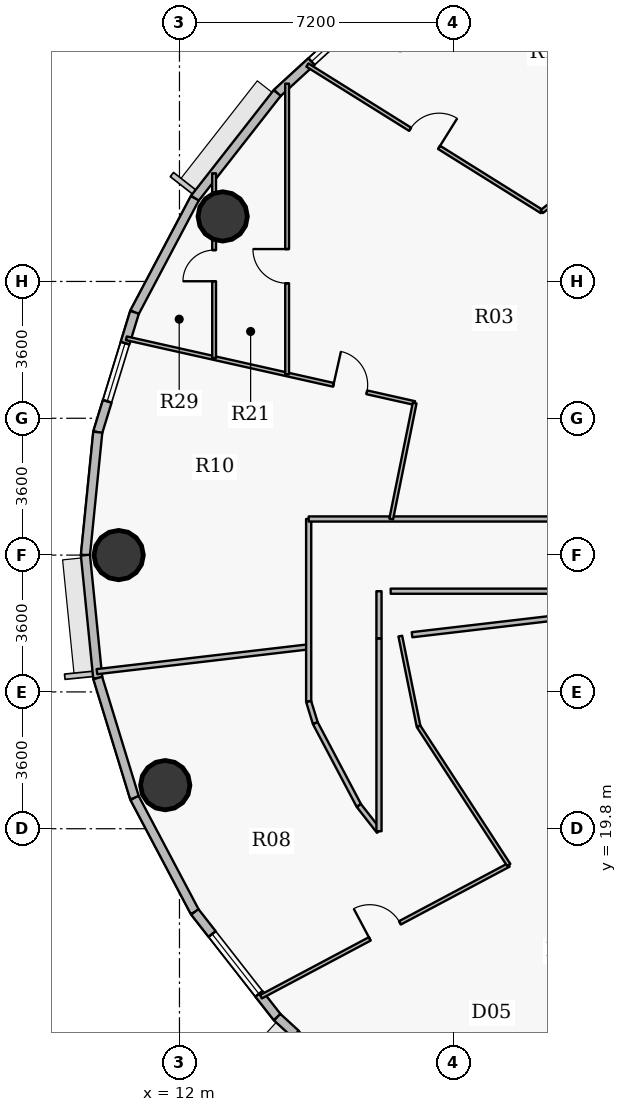
"""IFC4 building model, lengths in metres.
Left out: names, types, materials, properties, quantities, classifications, styles, units other than length and angle.
Written with IfcOpenShell. Run it as: python <this file> out.ifc"""

import sys

from ifc_helpers import new_model, si_unit, direction, frame, frame_2d, origin, origin_2d, place, context, subcontext, project, spatial, rectangle, hollow_circle, extrude, source, transform, mapped, element, fill, save


model = new_model("IFC4")
c1 = context("Model", 3, precision=1e-05, world=origin(), true_north=direction((0.0, 1.0)))
c2 = subcontext(c1, "Body", "Model", "MODEL_VIEW")
j1 = project(units=[si_unit("LENGTHUNIT", "METRE"), si_unit("PLANEANGLEUNIT", "RADIAN")], contexts=[c1])
p1 = place(None, origin())
s1 = spatial("IfcSite", under=j1, at=p1, CompositionType="ELEMENT")
p2 = place(p1, origin())
s2 = spatial("IfcBuilding", under=s1, at=p2, CompositionType="ELEMENT")
p3 = place(p2, frame((0.0, 0.0, 182.4)))
s3 = spatial("IfcBuildingStorey", under=s2, at=p3, CompositionType="ELEMENT", Elevation=182.4)
for number, where, z_axis, x_axis in (
    (1, (13.137, 35.911, 0.0), (0.0, 0.0, 1.0), (1.0, 0.0, 0.0)),
    (2, (10.4, 27.0, 0.0), (0.0, 0.0, 1.0), (1.0, 0.0, 0.0)),
    (3, (11.625, 20.947, 0.0), (0.0, 0.0, 1.0), (1.0, 0.0, 0.0)),
):
    element("IfcColumn", number, at=place(p3, frame(where, z_axis=z_axis, x_axis=x_axis)), inside=s3, PredefinedType="COLUMN", context=c2, shape_type="SweptSolid", body=[
        extrude(hollow_circle(Radius=0.65, WallThickness=0.04, at=origin_2d()), origin(), (0.0, 0.0, 1.0), 3.75),
    ])
p4 = place(p3, frame((14.572, 39.158, 0.0), z_axis=(0.0, 0.0, 1.0), x_axis=(0.737076565834, 0.675809245349, 0.0)))
e4 = element("IfcWall", 4, at=p4, inside=s3, PredefinedType="SOLIDWALL", context=c2, shape_type="SweptSolid", body=[
    extrude(rectangle(XDim=3.658, YDim=0.24, at=frame_2d((1.829, 0.0))), origin(), (0.0, 0.0, 1.0), 3.5),
])
p5 = place(p4, frame((1.224, 0.0, 0.9)))
e5 = element("IfcOpeningElement", 5, at=p5, cuts=e4, PredefinedType="OPENING", context=c2, shape_type="SweptSolid", body=[
    extrude(rectangle(XDim=1.25, YDim=1.65, at=origin_2d()), frame((0.625, 0.13, 0.825), z_axis=(0.0, -1.0, 0.0), x_axis=(1.0, 0.0, 0.0)), (0.0, 0.0, 1.0), 0.26),
])
p6 = place(p3, frame((12.404, 36.388, 0.0), z_axis=(0.0, 0.0, 1.0), x_axis=(0.616287674549, 0.787521112224, 0.0)))
e6 = element("IfcWall", 6, at=p6, inside=s3, PredefinedType="SOLIDWALL", context=c2, shape_type="SweptSolid", body=[
    extrude(rectangle(XDim=3.517, YDim=0.24, at=frame_2d((1.759, 0.0))), origin(), (0.0, 0.0, 1.0), 3.5),
])
p7 = place(p3, frame((10.817, 33.389, 0.0), z_axis=(0.0, 0.0, 1.0), x_axis=(0.467586874938, 0.88394712194, 0.0)))
e7 = element("IfcWall", 7, at=p7, inside=s3, PredefinedType="SOLIDWALL", context=c2, shape_type="SweptSolid", body=[
    extrude(rectangle(XDim=3.393, YDim=0.24, at=frame_2d((1.697, 0.0))), origin(), (0.0, 0.0, 1.0), 3.5),
])
p8 = place(p3, frame((9.85, 30.234, 0.0), z_axis=(0.0, 0.0, 1.0), x_axis=(0.293097995113, 0.956082405058, 0.0)))
e8 = element("IfcWall", 8, at=p8, inside=s3, PredefinedType="SOLIDWALL", context=c2, shape_type="SweptSolid", body=[
    extrude(rectangle(XDim=3.3, YDim=0.24, at=frame_2d((1.65, 0.0))), origin(), (0.0, 0.0, 1.0), 3.5),
])
p9 = place(p8, frame((0.85, 0.0, 0.9)))
e9 = element("IfcOpeningElement", 9, at=p9, cuts=e8, PredefinedType="OPENING", context=c2, shape_type="SweptSolid", body=[
    extrude(rectangle(XDim=1.6, YDim=1.75, at=origin_2d()), frame((0.8, 0.13, 0.875), z_axis=(0.0, -1.0, 0.0), x_axis=(1.0, 0.0, 0.0)), (0.0, 0.0, 1.0), 0.26),
])
for number, where, z_axis, x_axis in (
    (10, (9.525, 27.0, 0.0), (0.0, 0.0, 1.0), (0.1, 0.995, 0.0)),
    (11, (9.85, 23.766, 0.0), (0.0, 0.0, 1.0), (-0.1, 0.995, 0.0)),
):
    element("IfcWall", number, at=place(p3, frame(where, z_axis=z_axis, x_axis=x_axis)), inside=s3, PredefinedType="SOLIDWALL", context=c2, shape_type="SweptSolid", body=[
        extrude(rectangle(XDim=3.25, YDim=0.24, at=frame_2d((1.625, 0.0))), origin(), (0.0, 0.0, 1.0), 3.5),
    ])
p10 = place(p3, frame((10.817, 20.611, 0.0), z_axis=(0.0, 0.0, 1.0), x_axis=(-0.293097995113, 0.956082405058, 0.0)))
e12 = element("IfcWall", 12, at=p10, inside=s3, PredefinedType="SOLIDWALL", context=c2, shape_type="SweptSolid", body=[
    extrude(rectangle(XDim=3.3, YDim=0.24, at=frame_2d((1.65, 0.0))), origin(), (0.0, 0.0, 1.0), 3.5),
])
p11 = place(p3, frame((12.404, 17.612, 0.0), z_axis=(0.0, 0.0, 1.0), x_axis=(-0.467586874938, 0.88394712194, 0.0)))
e13 = element("IfcWall", 13, at=p11, inside=s3, PredefinedType="SOLIDWALL", context=c2, shape_type="SweptSolid", body=[
    extrude(rectangle(XDim=3.393, YDim=0.24, at=frame_2d((1.697, 0.0))), origin(), (0.0, 0.0, 1.0), 3.5),
])
p12 = place(p3, frame((14.572, 14.842, 0.0), z_axis=(0.0, 0.0, 1.0), x_axis=(-0.616287674549, 0.787521112224, 0.0)))
e14 = element("IfcWall", 14, at=p12, inside=s3, PredefinedType="SOLIDWALL", context=c2, shape_type="SweptSolid", body=[
    extrude(rectangle(XDim=3.517, YDim=0.24, at=frame_2d((1.759, 0.0))), origin(), (0.0, 0.0, 1.0), 3.5),
])
p13 = place(p12, frame((0.779, 0.0, 0.9)))
e15 = element("IfcOpeningElement", 15, at=p13, cuts=e14, PredefinedType="OPENING", context=c2, shape_type="SweptSolid", body=[
    extrude(rectangle(XDim=2.0, YDim=1.75, at=origin_2d()), frame((1.0, 0.13, 0.875), z_axis=(0.0, -1.0, 0.0), x_axis=(1.0, 0.0, 0.0)), (0.0, 0.0, 1.0), 0.26),
])
p14 = place(p3, frame((17.268, 12.369, 0.0), z_axis=(0.0, 0.0, 1.0), x_axis=(-0.737076565834, 0.675809245349, 0.0)))
e16 = element("IfcWall", 16, at=p14, inside=s3, PredefinedType="SOLIDWALL", context=c2, shape_type="SweptSolid", body=[
    extrude(rectangle(XDim=3.658, YDim=0.24, at=frame_2d((1.829, 0.0))), origin(), (0.0, 0.0, 1.0), 3.5),
])
p15 = place(p14, frame((1.746, 0.0, 0.9)))
e17 = element("IfcOpeningElement", 17, at=p15, cuts=e16, PredefinedType="OPENING", context=c2, shape_type="SweptSolid", body=[
    extrude(rectangle(XDim=1.25, YDim=1.65, at=origin_2d()), frame((0.625, 0.13, 0.825), z_axis=(0.0, -1.0, 0.0), x_axis=(1.0, 0.0, 0.0)), (0.0, 0.0, 1.0), 0.26),
])
p16 = place(p3, frame((9.828, 23.933, 0.0), z_axis=(0.0, 0.0, 1.0), x_axis=(0.993205157511, 0.116376608877, 0.0)))
e18 = element("IfcWall", 18, at=p16, inside=s3, PredefinedType="PARTITIONING", context=c2, shape_type="SweptSolid", body=[
    extrude(rectangle(XDim=5.61, YDim=0.135, at=frame_2d((2.805, 0.0))), origin(), (0.0, 0.0, 1.0), 2.935),
])
p17 = place(p3, frame((10.602, 32.704, 0.0), z_axis=(0.0, 0.0, 1.0), x_axis=(0.9756977614, -0.21912069368, 0.0)))
e19 = element("IfcWall", 19, at=p17, inside=s3, PredefinedType="PARTITIONING", context=c2, shape_type="SweptSolid", body=[
    extrude(rectangle(XDim=7.776, YDim=0.1, at=frame_2d((3.888, 0.0))), origin(), (0.0, 0.0, 1.0), 2.935),
])
p18 = place(p17, frame((5.586, 0.0, 0.0)))
e20 = element("IfcOpeningElement", 20, at=p18, cuts=e19, PredefinedType="OPENING", context=c2, shape_type="SweptSolid", body=[
    extrude(rectangle(XDim=0.9, YDim=2.1, at=origin_2d()), frame((0.45, 0.06, 1.05), z_axis=(0.0, -1.0, 0.0), x_axis=(1.0, 0.0, 0.0)), (0.0, 0.0, 1.0), 0.12),
])
p19 = place(p3, frame((12.912, 32.185, 0.0), z_axis=(0.0, 0.0, 1.0), x_axis=(0.0, 1.0, 0.0)))
e21 = element("IfcWall", 21, at=p19, inside=s3, PredefinedType="PARTITIONING", context=c2, shape_type="SweptSolid", body=[
    extrude(rectangle(XDim=4.86, YDim=0.1, at=frame_2d((2.43, 0.0))), origin(), (0.0, 0.0, 1.0), 2.935),
])
p20 = place(p19, frame((2.02, 0.0, 0.0)))
e22 = element("IfcOpeningElement", 22, at=p20, cuts=e21, PredefinedType="OPENING", context=c2, shape_type="SweptSolid", body=[
    extrude(rectangle(XDim=0.82, YDim=2.1, at=origin_2d()), frame((0.41, 0.06, 1.05), z_axis=(0.0, -1.0, 0.0), x_axis=(1.0, 0.0, 0.0)), (0.0, 0.0, 1.0), 0.12),
])
p21 = place(p3, frame((14.145, 15.379, 0.0), z_axis=(0.0, 0.0, 1.0), x_axis=(0.882946160832, 0.469474256027, 0.0)))
e23 = element("IfcWall", 23, at=p21, inside=s3, PredefinedType="PARTITIONING", context=c2, shape_type="SweptSolid", body=[
    extrude(rectangle(XDim=7.385, YDim=0.1, at=frame_2d((3.692, 0.0))), origin(), (0.0, 0.0, 1.0), 2.935),
])
p22 = place(p21, frame((3.242, 0.0, 0.0)))
e24 = element("IfcOpeningElement", 24, at=p22, cuts=e23, PredefinedType="OPENING", context=c2, shape_type="SweptSolid", body=[
    extrude(rectangle(XDim=0.9, YDim=2.1, at=origin_2d()), frame((0.45, 0.06, 1.05), z_axis=(0.0, -1.0, 0.0), x_axis=(1.0, 0.0, 0.0)), (0.0, 0.0, 1.0), 0.12),
])
p23 = place(p3, frame((14.833, 31.754, 0.0), z_axis=(0.0, 0.0, 1.0), x_axis=(0.0, 1.0, 0.0)))
e25 = element("IfcWall", 25, at=p23, inside=s3, PredefinedType="PARTITIONING", context=c2, shape_type="SweptSolid", body=[
    extrude(rectangle(XDim=7.651, YDim=0.1, at=frame_2d((3.825, 0.0))), origin(), (0.0, 0.0, 1.0), 2.935),
])
p24 = place(p23, frame((2.399, 0.0, 0.0)))
e26 = element("IfcOpeningElement", 26, at=p24, cuts=e25, PredefinedType="OPENING", context=c2, shape_type="SweptSolid", body=[
    extrude(rectangle(XDim=0.9, YDim=2.1, at=origin_2d()), frame((0.45, 0.06, 1.05), z_axis=(0.0, -1.0, 0.0), x_axis=(1.0, 0.0, 0.0)), (0.0, 0.0, 1.0), 0.12),
])
p25 = place(p3, frame((15.366, 39.894, 0.0), z_axis=(0.0, 0.0, 1.0), x_axis=(0.84804732756, -0.529920494242, 0.0)))
e27 = element("IfcWall", 27, at=p25, inside=s3, PredefinedType="PARTITIONING", context=c2, shape_type="SweptSolid", body=[
    extrude(rectangle(XDim=7.274, YDim=0.1, at=frame_2d((3.637, 0.0))), origin(), (0.0, 0.0, 1.0), 2.935),
])
p26 = place(p25, frame((3.187, 0.0, 0.0)))
e28 = element("IfcOpeningElement", 28, at=p26, cuts=e27, PredefinedType="OPENING", context=c2, shape_type="SweptSolid", body=[
    extrude(rectangle(XDim=0.9, YDim=2.1, at=origin_2d()), frame((0.45, 0.06, 1.05), z_axis=(0.0, -1.0, 0.0), x_axis=(1.0, 0.0, 0.0)), (0.0, 0.0, 1.0), 0.12),
])
p27 = place(p3, frame((15.4, 23.146, 0.0), z_axis=(0.0, 0.0, 1.0), x_axis=(0.0, 1.0, 0.0)))
e29 = element("IfcWall", 29, at=p27, inside=s3, PredefinedType="PARTITIONING", context=c2, shape_type="SweptSolid", body=[
    extrude(rectangle(XDim=4.804, YDim=0.135, at=frame_2d((2.402, 0.0))), origin(), (0.0, 0.0, 1.0), 2.935),
])
p28 = place(p3, frame((15.4, 23.146, 0.0), z_axis=(0.0, 0.0, 1.0), x_axis=(0.293335154151, -0.956009669061, 0.0)))
e30 = element("IfcWall", 30, at=p28, inside=s3, PredefinedType="PARTITIONING", context=c2, shape_type="SweptSolid", body=[
    extrude(rectangle(XDim=0.594, YDim=0.135, at=frame_2d((0.297, 0.0))), origin(), (0.0, 0.0, 1.0), 3.5),
])
p29 = place(p3, frame((15.4, 27.95, 0.0), z_axis=(0.0, 0.0, 1.0), x_axis=(1.0, 0.0, 0.0)))
e31 = element("IfcWall", 31, at=p29, inside=s3, PredefinedType="PARTITIONING", context=c2, shape_type="SweptSolid", body=[
    extrude(rectangle(XDim=8.95, YDim=0.135, at=frame_2d((4.475, 0.0))), origin(), (0.0, 0.0, 1.0), 3.5),
])
p30 = place(p3, frame((15.574, 22.578, 0.0), z_axis=(0.0, 0.0, 1.0), x_axis=(0.46757196543, -0.883955008552, 0.0)))
e32 = element("IfcWall", 32, at=p30, inside=s3, PredefinedType="PARTITIONING", context=c2, shape_type="SweptSolid", body=[
    extrude(rectangle(XDim=2.451, YDim=0.135, at=frame_2d((1.226, 0.0))), origin(), (0.0, 0.0, 1.0), 2.935),
])
p31 = place(p3, frame((16.72, 20.411, 0.0), z_axis=(0.0, 0.0, 1.0), x_axis=(0.616377221056, -0.787451027914, 0.0)))
e33 = element("IfcWall", 33, at=p31, inside=s3, PredefinedType="PARTITIONING", context=c2, shape_type="SweptSolid", body=[
    extrude(rectangle(XDim=0.859, YDim=0.135, at=frame_2d((0.43, 0.0))), origin(), (0.0, 0.0, 1.0), 3.5),
])
p32 = place(p3, frame((17.25, 19.734, 0.0), z_axis=(0.0, 0.0, 1.0), x_axis=(0.0, 1.0, 0.0)))
e34 = element("IfcWall", 34, at=p32, inside=s3, PredefinedType="PARTITIONING", context=c2, shape_type="SweptSolid", body=[
    extrude(rectangle(XDim=5.068, YDim=0.135, at=frame_2d((2.534, 0.0))), origin(), (0.0, 0.0, 1.0), 2.935),
])
p33 = place(p3, frame((17.572, 27.95, 0.0), z_axis=(0.0, 0.0, 1.0), x_axis=(0.19818274337, 0.980165088253, 0.0)))
e35 = element("IfcWall", 35, at=p33, inside=s3, PredefinedType="PARTITIONING", context=c2, shape_type="SweptSolid", body=[
    extrude(rectangle(XDim=3.112, YDim=0.1, at=frame_2d((1.556, 0.0))), origin(), (0.0, 0.0, 1.0), 3.5),
])
p34 = place(p3, frame((17.811, 24.868, 0.0), z_axis=(0.0, 0.0, 1.0), x_axis=(0.198247700743, -0.980151952072, 0.0)))
e36 = element("IfcWall", 36, at=p34, inside=s3, PredefinedType="PARTITIONING", context=c2, shape_type="SweptSolid", body=[
    extrude(rectangle(XDim=2.422, YDim=0.1, at=frame_2d((1.211, 0.0))), origin(), (0.0, 0.0, 1.0), 2.935),
])
p35 = place(p3, frame((18.291, 22.494, 0.0), z_axis=(0.0, 0.0, 1.0), x_axis=(0.545410225271, -0.838169246734, 0.0)))
e37 = element("IfcWall", 37, at=p35, inside=s3, PredefinedType="PARTITIONING", context=c2, shape_type="SweptSolid", body=[
    extrude(rectangle(XDim=4.352, YDim=0.1, at=frame_2d((2.176, 0.0))), origin(), (0.0, 0.0, 1.0), 2.935),
])
p36 = place(p3, frame((21.259, 9.852, 0.0), z_axis=(0.0, 0.0, 1.0), x_axis=(0.651889454341, 0.758314011026, 0.0)))
e38 = element("IfcWall", 38, at=p36, inside=s3, PredefinedType="PARTITIONING", context=c2, shape_type="SweptSolid", body=[
    extrude(rectangle(XDim=10.942, YDim=0.135, at=frame_2d((5.471, 0.0))), origin(), (0.0, 0.0, 1.0), 2.935),
])
p37 = place(p3, frame((21.534, 36.039, 0.0), z_axis=(0.0, 0.0, 1.0), x_axis=(0.787313734036, 0.616552580238, 0.0)))
e39 = element("IfcWall", 39, at=p37, inside=s3, PredefinedType="PARTITIONING", context=c2, shape_type="SweptSolid", body=[
    extrude(rectangle(XDim=4.472, YDim=0.1, at=frame_2d((2.236, 0.0))), origin(), (0.0, 0.0, 1.0), 2.935),
])
p38 = place(p3, frame((17.25, 26.05, 0.0), z_axis=(0.0, 0.0, 1.0), x_axis=(0.0, -1.0, 0.0)))
e40 = element("IfcWall", 40, at=p38, inside=s3, PredefinedType="PARTITIONING", context=c2, shape_type="SweptSolid", body=[
    extrude(rectangle(XDim=1.238, YDim=0.135, at=frame_2d((0.619, 0.0))), origin(), (0.0, 0.0, 1.0), 3.085),
])
p39 = place(p3, frame((24.042, 26.05, 0.0), z_axis=(0.0, 0.0, 1.0), x_axis=(-1.0, 0.0, 0.0)))
e41 = element("IfcWall", 41, at=p39, inside=s3, PredefinedType="PARTITIONING", context=c2, shape_type="SweptSolid", body=[
    extrude(rectangle(XDim=6.485, YDim=0.135, at=frame_2d((3.242, 0.0))), origin(), (0.0, 0.0, 1.0), 3.5),
])
p40 = place(p3, frame((18.12, 24.905, 0.0), z_axis=(0.0, 0.0, 1.0), x_axis=(0.993204061109, 0.116385965632, 0.0)))
e42 = element("IfcWall", 42, at=p40, inside=s3, PredefinedType="PARTITIONING", context=c2, shape_type="SweptSolid", body=[
    extrude(rectangle(XDim=5.943, YDim=0.135, at=frame_2d((2.971, 0.0))), origin(), (0.0, 0.0, 1.0), 3.5),
])
m1 = source(origin(), c2, "Body", "SweptSolid", [
    extrude(rectangle(XDim=1.6, YDim=1.75, at=origin_2d()), frame((0.8, 0.03, 0.875), z_axis=(0.0, -1.0, 0.0), x_axis=(1.0, 0.0, 0.0)), (0.0, 0.0, 1.0), 0.06),
])
p41 = place(p9, origin())
e43 = element("IfcWindow", 43, at=p41, inside=s3, PartitioningType="DOUBLE_PANEL_VERTICAL", PredefinedType="WINDOW", context=c2, shape_type="MappedRepresentation", body=[
    mapped(m1, transform((0.0, 0.0, 0.0), x_axis=(1.0, 0.0, 0.0), y_axis=(0.0, 1.0, 0.0), z_axis=(0.0, 0.0, 1.0), scale=1.0)),
])
fill(e9, e43)
m2 = source(origin(), c2, "Body", "SweptSolid", [
    extrude(rectangle(XDim=2.0, YDim=1.75, at=origin_2d()), frame((1.0, 0.03, 0.875), z_axis=(0.0, -1.0, 0.0), x_axis=(1.0, 0.0, 0.0)), (0.0, 0.0, 1.0), 0.06),
])
p42 = place(p13, origin())
e44 = element("IfcWindow", 44, at=p42, inside=s3, PartitioningType="DOUBLE_PANEL_VERTICAL", PredefinedType="WINDOW", context=c2, shape_type="MappedRepresentation", body=[
    mapped(m2, transform((0.0, 0.0, 0.0), x_axis=(1.0, 0.0, 0.0), y_axis=(0.0, 1.0, 0.0), z_axis=(0.0, 0.0, 1.0), scale=1.0)),
])
fill(e15, e44)
m3 = source(origin(), c2, "Body", "SweptSolid", [
    extrude(rectangle(XDim=1.25, YDim=1.65, at=origin_2d()), frame((0.625, 0.03, 0.825), z_axis=(0.0, -1.0, 0.0), x_axis=(1.0, 0.0, 0.0)), (0.0, 0.0, 1.0), 0.06),
])
p43 = place(p5, origin())
e45 = element("IfcWindow", 45, at=p43, inside=s3, PartitioningType="SINGLE_PANEL", PredefinedType="WINDOW", context=c2, shape_type="MappedRepresentation", body=[
    mapped(m3, transform((0.0, 0.0, 0.0), x_axis=(1.0, 0.0, 0.0), y_axis=(0.0, 1.0, 0.0), z_axis=(0.0, 0.0, 1.0), scale=1.0)),
])
fill(e5, e45)
m4 = source(origin(), c2, "Body", "SweptSolid", [
    extrude(rectangle(XDim=0.9, YDim=2.1, at=origin_2d()), frame((0.45, 0.025, 1.05), z_axis=(0.0, -1.0, 0.0), x_axis=(1.0, 0.0, 0.0)), (0.0, 0.0, 1.0), 0.05),
])
p44 = place(p26, origin())
e46 = element("IfcDoor", 46, at=p44, inside=s3, OperationType="SINGLE_SWING_RIGHT", PredefinedType="DOOR", context=c2, shape_type="MappedRepresentation", body=[
    mapped(m4, transform((0.0, 0.0, 0.0), x_axis=(1.0, 0.0, 0.0), y_axis=(0.0, 1.0, 0.0), z_axis=(0.0, 0.0, 1.0), scale=1.0)),
])
fill(e28, e46)
p45 = place(p18, origin())
e47 = element("IfcDoor", 47, at=p45, inside=s3, OperationType="SINGLE_SWING_LEFT", PredefinedType="DOOR", context=c2, shape_type="MappedRepresentation", body=[
    mapped(m4, transform((0.0, 0.0, 0.0), x_axis=(1.0, 0.0, 0.0), y_axis=(0.0, 1.0, 0.0), z_axis=(0.0, 0.0, 1.0), scale=1.0)),
])
fill(e20, e47)
p46 = place(p24, origin())
e48 = element("IfcDoor", 48, at=p46, inside=s3, OperationType="SINGLE_SWING_RIGHT", PredefinedType="DOOR", context=c2, shape_type="MappedRepresentation", body=[
    mapped(m4, transform((0.0, 0.0, 0.0), x_axis=(1.0, 0.0, 0.0), y_axis=(0.0, 1.0, 0.0), z_axis=(0.0, 0.0, 1.0), scale=1.0)),
])
fill(e26, e48)
m5 = source(origin(), c2, "Body", "SweptSolid", [
    extrude(rectangle(XDim=0.82, YDim=2.1, at=origin_2d()), frame((0.41, 0.025, 1.05), z_axis=(0.0, -1.0, 0.0), x_axis=(1.0, 0.0, 0.0)), (0.0, 0.0, 1.0), 0.05),
])
p47 = place(p20, origin())
e49 = element("IfcDoor", 49, at=p47, inside=s3, OperationType="SINGLE_SWING_LEFT", PredefinedType="DOOR", context=c2, shape_type="MappedRepresentation", body=[
    mapped(m5, transform((0.0, 0.0, 0.0), x_axis=(1.0, 0.0, 0.0), y_axis=(0.0, 1.0, 0.0), z_axis=(0.0, 0.0, 1.0), scale=1.0)),
])
fill(e22, e49)
p48 = place(p22, origin())
e50 = element("IfcDoor", 50, at=p48, inside=s3, OperationType="SINGLE_SWING_LEFT", PredefinedType="DOOR", context=c2, shape_type="MappedRepresentation", body=[
    mapped(m4, transform((0.0, 0.0, 0.0), x_axis=(1.0, 0.0, 0.0), y_axis=(0.0, 1.0, 0.0), z_axis=(0.0, 0.0, 1.0), scale=1.0)),
])
fill(e24, e50)
save(model, sys.argv[1])
